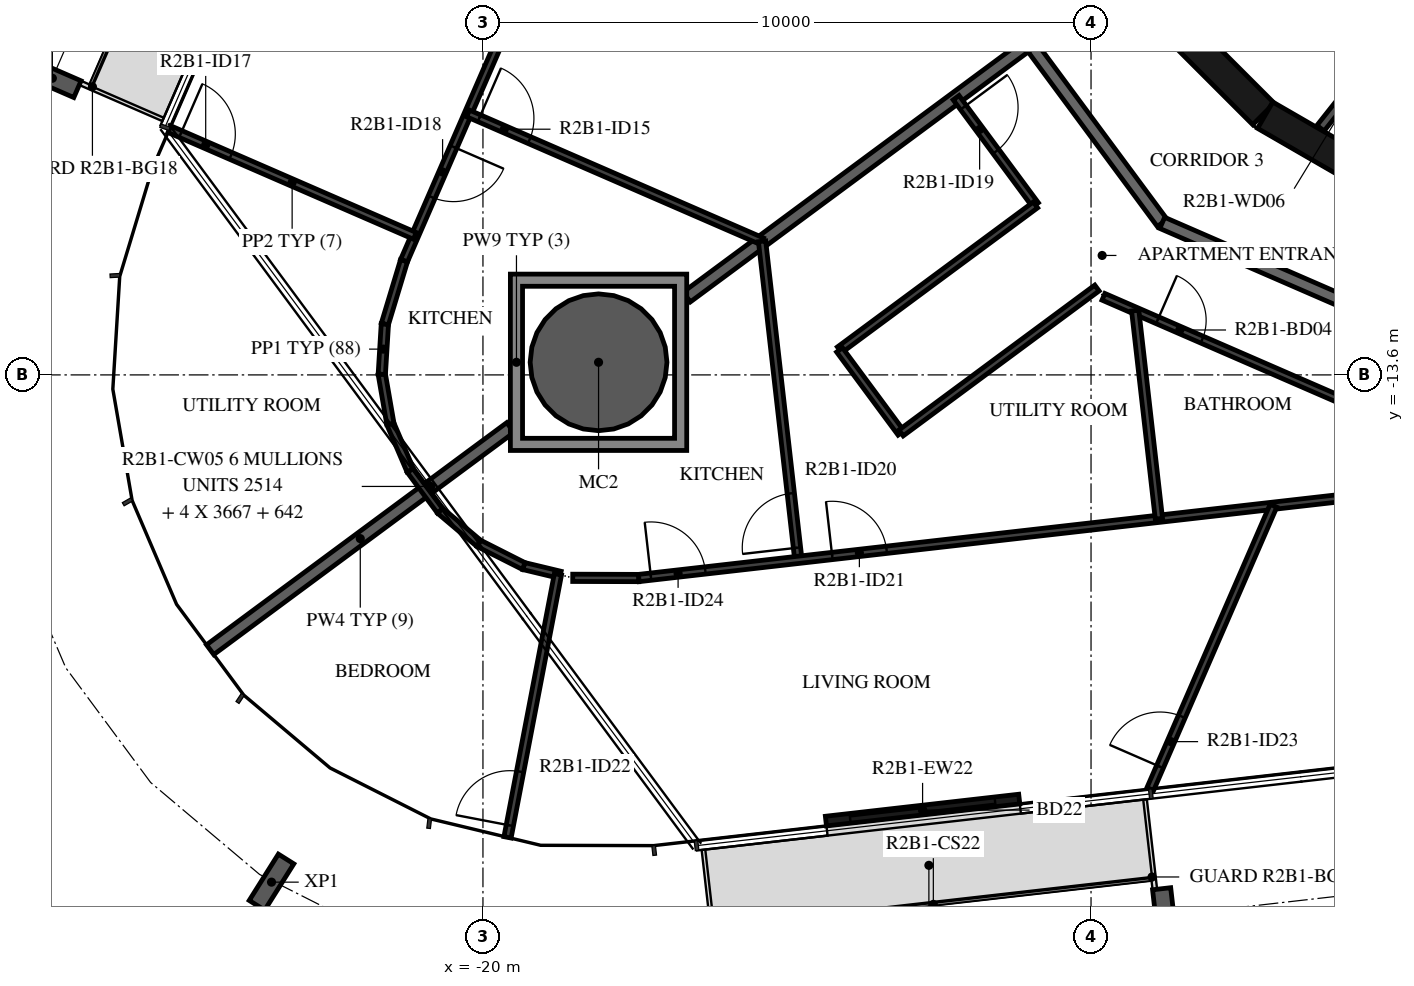
"""IFC4 building model, lengths in metres.
Left out: names, types, materials, properties, quantities, classifications, styles, units other than length and angle.
Written with IfcOpenShell. Run it as: python <this file> out.ifc"""

import sys

from ifc_helpers import new_model, si_unit, direction, frame, frame_2d, origin, origin_2d, place, context, subcontext, project, spatial, polyline, rectangle, hollow_circle, i_section, outline, extrude, element, fill, save


model = new_model("IFC4")
c1 = context("Model", 3, precision=1e-05, world=origin(), true_north=direction((0.0, 1.0)))
c2 = subcontext(c1, "Body", "Model", "MODEL_VIEW")
j1 = project(units=[si_unit("LENGTHUNIT", "METRE"), si_unit("PLANEANGLEUNIT", "RADIAN")], contexts=[c1])
p1 = place(None, origin())
s1 = spatial("IfcSite", under=j1, at=p1, CompositionType="ELEMENT")
p2 = place(p1, origin())
s2 = spatial("IfcBuilding", under=s1, at=p2, CompositionType="ELEMENT")
p3 = place(p2, frame((0.0, 0.0, 87.2)))
s3 = spatial("IfcBuildingStorey", under=s2, at=p3, CompositionType="ELEMENT", Elevation=87.2)
p4 = place(p3, frame((-18.099, -13.393, -0.38), z_axis=(0.0, 0.0, 1.0), x_axis=(1.0, 0.0, 0.0)))
e1 = element("IfcColumn", 1, at=p4, inside=s3, PredefinedType="COLUMN", context=c2, shape_type="SweptSolid", body=[
    extrude(hollow_circle(Radius=1.125, WallThickness=0.055, at=origin_2d()), origin(), (0.0, 0.0, 1.0), 3.5),
])
for number, where, z_axis, x_axis in (
    (2, (-27.081, -8.722, -0.38), (0.0, 0.0, 1.0), (0.399, 0.917, 0.0)),
    (3, (-23.477, -21.941, -0.38), (0.0, 0.0, 1.0), (-0.846, 0.532, 0.0)),
    (4, (-8.788, -22.497, -0.38), (0.0, 0.0, 1.0), (-0.994, -0.113, 0.0)),
):
    element("IfcColumn", number, at=place(p3, frame(where, z_axis=z_axis, x_axis=x_axis)), inside=s3, PredefinedType="COLUMN", context=c2, shape_type="SweptSolid", body=[
        extrude(i_section(OverallWidth=0.3, OverallDepth=0.9, WebThickness=0.019, FlangeThickness=0.035, FilletRadius=0.03, at=origin_2d()), origin(), (0.0, 0.0, 1.0), 3.5),
    ])
p5 = place(p3, frame((-14.36, -20.938, 0.0), z_axis=(0.0, 0.0, 1.0), x_axis=(0.993569019005, 0.11322810814, 0.0)))
e5 = element("IfcWall", 5, at=p5, inside=s3, PredefinedType="STANDARD", context=c2, shape_type="SweptSolid", body=[
    extrude(rectangle(XDim=3.2, YDim=0.16, at=frame_2d((1.6, 0.0))), origin(), (0.0, 0.0, 1.0), 3.12),
])
p6 = place(p5, frame((0.4, 0.0, 0.0)))
e6 = element("IfcOpeningElement", 6, at=p6, cuts=e5, PredefinedType="OPENING", context=c2, shape_type="SweptSolid", body=[
    extrude(rectangle(XDim=2.4, YDim=2.4, at=frame_2d((1.2, 1.2))), frame((0.0, 0.09, 0.0), z_axis=(0.0, -1.0, 0.0), x_axis=(1.0, 0.0, 0.0)), (0.0, 0.0, 1.0), 0.18),
])
p7 = place(p3, frame((-9.308, -7.164, 0.0), z_axis=(0.0, 0.0, 1.0), x_axis=(0.707106781187, -0.707106781187, 0.0)))
e7 = element("IfcWall", 7, at=p7, inside=s3, PredefinedType="SHEAR", context=c2, shape_type="SweptSolid", body=[
    extrude(rectangle(XDim=3.032, YDim=0.5, at=frame_2d((1.516, 0.0))), origin(), (0.0, 0.0, 1.0), 3.12),
])
p8 = place(p3, frame((-7.137, -9.329, 0.0), z_axis=(0.0, 0.0, 1.0), x_axis=(0.865975092491, -0.500087131594, 0.0)))
e8 = element("IfcWall", 8, at=p8, inside=s3, PredefinedType="SHEAR", context=c2, shape_type="SweptSolid", body=[
    extrude(rectangle(XDim=3.033, YDim=0.5, at=frame_2d((1.516, 0.0))), origin(), (0.0, 0.0, 1.0), 3.12),
])
p9 = place(p3, frame((-4.706, -7.625, 0.0), z_axis=(0.0, 0.0, 1.0), x_axis=(-0.621392599334, -0.783499353856, 0.0)))
e9 = element("IfcWall", 9, at=p9, inside=s3, PredefinedType="PARTITIONING", context=c2, shape_type="SweptSolid", body=[
    extrude(rectangle(XDim=2.447, YDim=0.15, at=frame_2d((1.224, 0.0))), origin(), (0.0, 0.0, 1.0), 3.12),
])
p10 = place(p9, frame((0.774, 0.0, 0.0)))
e10 = element("IfcOpeningElement", 10, at=p10, cuts=e9, PredefinedType="OPENING", context=c2, shape_type="SweptSolid", body=[
    extrude(rectangle(XDim=0.9, YDim=2.1, at=frame_2d((0.45, 1.05))), frame((0.0, 0.085, 0.0), z_axis=(0.0, -1.0, 0.0), x_axis=(1.0, 0.0, 0.0)), (0.0, 0.0, 1.0), 0.17),
])
p11 = place(p3, frame((-13.196, -5.198, 0.0), z_axis=(0.0, 0.0, 1.0), x_axis=(0.594805187394, -0.803869883159, 0.0)))
e11 = element("IfcWall", 11, at=p11, inside=s3, PredefinedType="STANDARD", context=c2, shape_type="SweptSolid", body=[
    extrude(rectangle(XDim=7.342, YDim=0.2, at=frame_2d((3.671, 0.0))), origin(), (0.0, 0.0, 1.0), 3.12),
])
p12 = place(p3, frame((-8.829, -11.1, 0.0), z_axis=(0.0, 0.0, 1.0), x_axis=(0.917063622491, -0.398740908742, 0.0)))
e12 = element("IfcWall", 12, at=p12, inside=s3, PredefinedType="STANDARD", context=c2, shape_type="SweptSolid", body=[
    extrude(rectangle(XDim=7.24, YDim=0.2, at=frame_2d((3.62, 0.0))), origin(), (0.0, 0.0, 1.0), 3.12),
])
p13 = place(p12, frame((6.04, 0.0, 0.0)))
e13 = element("IfcOpeningElement", 13, at=p13, cuts=e12, PredefinedType="OPENING", context=c2, shape_type="SweptSolid", body=[
    extrude(rectangle(XDim=1.0, YDim=2.1, at=frame_2d((0.5, 1.05))), frame((0.0, 0.11, 0.0), z_axis=(0.0, -1.0, 0.0), x_axis=(1.0, 0.0, 0.0)), (0.0, 0.0, 1.0), 0.22),
])
p14 = place(p3, frame((-16.649, -12.32, 0.0), z_axis=(0.0, 0.0, 1.0), x_axis=(0.803869204071, 0.594806105169, 0.0)))
e14 = element("IfcWall", 14, at=p14, inside=s3, PredefinedType="STANDARD", context=c2, shape_type="SweptSolid", body=[
    extrude(rectangle(XDim=7.011, YDim=0.2, at=frame_2d((3.506, 0.0))), origin(), (0.0, 0.0, 1.0), 3.12),
])
p15 = place(p3, frame((-24.486, -18.119, 0.0), z_axis=(0.0, 0.0, 1.0), x_axis=(0.80384227933, 0.594842491726, 0.0)))
e15 = element("IfcWall", 15, at=p15, inside=s3, PredefinedType="STANDARD", context=c2, shape_type="SweptSolid", body=[
    extrude(rectangle(XDim=6.142, YDim=0.2, at=frame_2d((3.071, 0.0))), origin(), (0.0, 0.0, 1.0), 3.12),
])
p16 = place(p3, frame((-17.109, -2.089, 0.0), z_axis=(0.0, 0.0, 1.0), x_axis=(-0.398743957683, -0.9170622968, 0.0)))
e16 = element("IfcWall", 16, at=p16, inside=s3, PredefinedType="PARTITIONING", context=c2, shape_type="SweptSolid", body=[
    extrude(rectangle(XDim=10.505, YDim=0.12, at=frame_2d((5.252, 0.0))), origin(), (0.0, 0.0, 1.0), 3.12),
])
p17 = place(p16, frame((2.056, 0.0, 0.0)))
e17 = element("IfcOpeningElement", 17, at=p17, cuts=e16, PredefinedType="OPENING", context=c2, shape_type="SweptSolid", body=[
    extrude(rectangle(XDim=0.9, YDim=2.1, at=frame_2d((0.45, 1.05))), frame((0.0, 0.07, 0.0), z_axis=(0.0, -1.0, 0.0), x_axis=(1.0, 0.0, 0.0)), (0.0, 0.0, 1.0), 0.14),
])
p18 = place(p16, frame((8.464, 0.0, 0.0)))
e18 = element("IfcOpeningElement", 18, at=p18, cuts=e16, PredefinedType="OPENING", context=c2, shape_type="SweptSolid", body=[
    extrude(rectangle(XDim=0.9, YDim=2.1, at=frame_2d((0.45, 1.05))), frame((0.0, 0.07, 0.0), z_axis=(0.0, -1.0, 0.0), x_axis=(1.0, 0.0, 0.0)), (0.0, 0.0, 1.0), 0.14),
])
p19 = place(p3, frame((-20.245, -9.3, 0.0), z_axis=(0.0, 0.0, 1.0), x_axis=(0.91706784774, -0.398731190956, 0.0)))
e19 = element("IfcWall", 19, at=p19, inside=s3, PredefinedType="PARTITIONING", context=c2, shape_type="SweptSolid", body=[
    extrude(rectangle(XDim=5.272, YDim=0.12, at=frame_2d((2.636, 0.0))), origin(), (0.0, 0.0, 1.0), 3.12),
])
p20 = place(p19, frame((0.2, 0.0, 0.0)))
e20 = element("IfcOpeningElement", 20, at=p20, cuts=e19, PredefinedType="OPENING", context=c2, shape_type="SweptSolid", body=[
    extrude(rectangle(XDim=0.9, YDim=2.1, at=frame_2d((0.45, 1.05))), frame((0.0, 0.07, 0.0), z_axis=(0.0, -1.0, 0.0), x_axis=(1.0, 0.0, 0.0)), (0.0, 0.0, 1.0), 0.14),
])
p21 = place(p3, frame((-25.156, -9.559, 0.0), z_axis=(0.0, 0.0, 1.0), x_axis=(0.917042707292, -0.398789008127, 0.0)))
e21 = element("IfcWall", 21, at=p21, inside=s3, PredefinedType="PARTITIONING", context=c2, shape_type="SweptSolid", body=[
    extrude(rectangle(XDim=4.4, YDim=0.12, at=frame_2d((2.2, 0.0))), origin(), (0.0, 0.0, 1.0), 2.73),
])
p22 = place(p21, frame((0.2, 0.0, 0.0)))
e22 = element("IfcOpeningElement", 22, at=p22, cuts=e21, PredefinedType="OPENING", context=c2, shape_type="SweptSolid", body=[
    extrude(rectangle(XDim=0.9, YDim=2.1, at=frame_2d((0.45, 1.05))), frame((0.0, 0.07, 0.0), z_axis=(0.0, -1.0, 0.0), x_axis=(1.0, 0.0, 0.0)), (0.0, 0.0, 1.0), 0.14),
])
for number, where, z_axis, x_axis in (
    (23, (-20.703, -15.835, 0.0), (0.0, 0.0, 1.0), (-0.595, 0.804, 0.0)),
    (24, (-21.196, -15.168, 0.0), (0.0, 0.0, 1.0), (-0.394, 0.919, 0.0)),
):
    element("IfcWall", number, at=place(p3, frame(where, z_axis=z_axis, x_axis=x_axis)), inside=s3, PredefinedType="PARTITIONING", context=c2, shape_type="SweptSolid", body=[
        extrude(rectangle(XDim=0.829, YDim=0.12, at=frame_2d((0.415, 0.0))), origin(), (0.0, 0.0, 1.0), 3.12),
    ])
p23 = place(p3, frame((-21.522, -14.406, 0.0), z_axis=(0.0, 0.0, 1.0), x_axis=(-0.170794347099, 0.985306698952, 0.0)))
e25 = element("IfcWall", 25, at=p23, inside=s3, PredefinedType="PARTITIONING", context=c2, shape_type="SweptSolid", body=[
    extrude(rectangle(XDim=0.829, YDim=0.12, at=frame_2d((0.415, 0.0))), origin(), (0.0, 0.0, 1.0), 3.12),
])
p24 = place(p3, frame((-21.664, -13.59, 0.0), z_axis=(0.0, 0.0, 1.0), x_axis=(0.061277779288, 0.998120751095, 0.0)))
e26 = element("IfcWall", 26, at=p24, inside=s3, PredefinedType="PARTITIONING", context=c2, shape_type="SweptSolid", body=[
    extrude(rectangle(XDim=0.829, YDim=0.12, at=frame_2d((0.414, 0.0))), origin(), (0.0, 0.0, 1.0), 3.12),
])
p25 = place(p3, frame((-21.613, -12.762, 0.0), z_axis=(0.0, 0.0, 1.0), x_axis=(0.289552239308, 0.95716221233, 0.0)))
e27 = element("IfcWall", 27, at=p25, inside=s3, PredefinedType="PARTITIONING", context=c2, shape_type="SweptSolid", body=[
    extrude(rectangle(XDim=1.087, YDim=0.12, at=frame_2d((0.543, 0.0))), origin(), (0.0, 0.0, 1.0), 3.12),
])
p26 = place(p3, frame((-12.219, -9.041, 0.0), z_axis=(0.0, 0.0, 1.0), x_axis=(0.59482286703, -0.803856801214, 0.0)))
e28 = element("IfcWall", 28, at=p26, inside=s3, PredefinedType="PARTITIONING", context=c2, shape_type="SweptSolid", body=[
    extrude(rectangle(XDim=2.193, YDim=0.12, at=frame_2d((1.097, 0.0))), origin(), (0.0, 0.0, 1.0), 3.12),
])
p27 = place(p26, frame((0.2, 0.0, 0.0)))
e29 = element("IfcOpeningElement", 29, at=p27, cuts=e28, PredefinedType="OPENING", context=c2, shape_type="SweptSolid", body=[
    extrude(rectangle(XDim=0.9, YDim=2.1, at=frame_2d((0.45, 1.05))), frame((0.0, 0.07, 0.0), z_axis=(0.0, -1.0, 0.0), x_axis=(1.0, 0.0, 0.0)), (0.0, 0.0, 1.0), 0.14),
])
p28 = place(p3, frame((-10.914, -10.804, 0.0), z_axis=(0.0, 0.0, 1.0), x_axis=(-0.803864616889, -0.594812304609, 0.0)))
e30 = element("IfcWall", 30, at=p28, inside=s3, PredefinedType="PARTITIONING", context=c2, shape_type="SweptSolid", body=[
    extrude(rectangle(XDim=4.008, YDim=0.12, at=frame_2d((2.004, 0.0))), origin(), (0.0, 0.0, 1.0), 3.12),
])
p29 = place(p3, frame((-14.136, -13.188, 0.0), z_axis=(0.0, 0.0, 1.0), x_axis=(0.594863421241, -0.803826791087, 0.0)))
e31 = element("IfcWall", 31, at=p29, inside=s3, PredefinedType="PARTITIONING", context=c2, shape_type="SweptSolid", body=[
    extrude(rectangle(XDim=1.7, YDim=0.12, at=frame_2d((0.85, 0.0))), origin(), (0.0, 0.0, 1.0), 3.12),
])
p30 = place(p3, frame((-13.125, -14.555, 0.0), z_axis=(0.0, 0.0, 1.0), x_axis=(0.80389374229, 0.594772940799, 0.0)))
e32 = element("IfcWall", 32, at=p30, inside=s3, PredefinedType="PARTITIONING", context=c2, shape_type="SweptSolid", body=[
    extrude(rectangle(XDim=4.008, YDim=0.12, at=frame_2d((2.004, 0.0))), origin(), (0.0, 0.0, 1.0), 3.12),
])
p31 = place(p3, frame((-9.796, -12.315, 0.0), z_axis=(0.0, 0.0, 1.0), x_axis=(0.917059572812, -0.398750222463, 0.0)))
e33 = element("IfcWall", 33, at=p31, inside=s3, PredefinedType="PARTITIONING", context=c2, shape_type="SweptSolid", body=[
    extrude(rectangle(XDim=8.146, YDim=0.12, at=frame_2d((4.073, 0.0))), origin(), (0.0, 0.0, 1.0), 3.12),
])
p32 = place(p31, frame((0.969, 0.0, 0.0)))
e34 = element("IfcOpeningElement", 34, at=p32, cuts=e33, PredefinedType="OPENING", context=c2, shape_type="SweptSolid", body=[
    extrude(rectangle(XDim=0.8, YDim=2.1, at=frame_2d((0.4, 1.05))), frame((0.0, 0.07, 0.0), z_axis=(0.0, -1.0, 0.0), x_axis=(1.0, 0.0, 0.0)), (0.0, 0.0, 1.0), 0.14),
])
p33 = place(p3, frame((-18.728, -16.888, 0.0), z_axis=(0.0, 0.0, 1.0), x_axis=(-0.972351484507, 0.233522141512, 0.0)))
e35 = element("IfcWall", 35, at=p33, inside=s3, PredefinedType="PARTITIONING", context=c2, shape_type="SweptSolid", body=[
    extrude(rectangle(XDim=0.619, YDim=0.12, at=frame_2d((0.31, 0.0))), origin(), (0.0, 0.0, 1.0), 3.12),
])
for number, where, z_axis, x_axis in (
    (36, (-19.33, -16.744, 0.0), (0.0, 0.0, 1.0), (-0.892, 0.451, 0.0)),
    (37, (-20.069, -16.369, 0.0), (0.0, 0.0, 1.0), (-0.764, 0.645, 0.0)),
):
    element("IfcWall", number, at=place(p3, frame(where, z_axis=z_axis, x_axis=x_axis)), inside=s3, PredefinedType="PARTITIONING", context=c2, shape_type="SweptSolid", body=[
        extrude(rectangle(XDim=0.829, YDim=0.12, at=frame_2d((0.415, 0.0))), origin(), (0.0, 0.0, 1.0), 3.12),
    ])
p34 = place(p3, frame((-19.596, -21.205, 0.0), z_axis=(0.0, 0.0, 1.0), x_axis=(0.188168961647, 0.982136671687, 0.0)))
e38 = element("IfcWall", 38, at=p34, inside=s3, PredefinedType="PARTITIONING", context=c2, shape_type="SweptSolid", body=[
    extrude(rectangle(XDim=4.405, YDim=0.12, at=frame_2d((2.202, 0.0))), origin(), (0.0, 0.0, 1.0), 3.12),
])
p35 = place(p34, frame((0.2, 0.0, 0.0)))
e39 = element("IfcOpeningElement", 39, at=p35, cuts=e38, PredefinedType="OPENING", context=c2, shape_type="SweptSolid", body=[
    extrude(rectangle(XDim=0.9, YDim=2.1, at=frame_2d((0.45, 1.05))), frame((0.0, 0.07, 0.0), z_axis=(0.0, -1.0, 0.0), x_axis=(1.0, 0.0, 0.0)), (0.0, 0.0, 1.0), 0.14),
])
p36 = place(p3, frame((-14.813, -16.641, 0.0), z_axis=(0.0, 0.0, 1.0), x_axis=(-0.113210971478, 0.993570971767, 0.0)))
e40 = element("IfcWall", 40, at=p36, inside=s3, PredefinedType="PARTITIONING", context=c2, shape_type="SweptSolid", body=[
    extrude(rectangle(XDim=5.273, YDim=0.12, at=frame_2d((2.636, 0.0))), origin(), (0.0, 0.0, 1.0), 3.12),
])
p37 = place(p36, frame((0.2, 0.0, 0.0)))
e41 = element("IfcOpeningElement", 41, at=p37, cuts=e40, PredefinedType="OPENING", context=c2, shape_type="SweptSolid", body=[
    extrude(rectangle(XDim=0.9, YDim=2.1, at=frame_2d((0.45, 1.05))), frame((0.0, 0.07, 0.0), z_axis=(0.0, -1.0, 0.0), x_axis=(1.0, 0.0, 0.0)), (0.0, 0.0, 1.0), 0.14),
])
p38 = place(p3, frame((-18.524, -16.937, 0.0), z_axis=(0.0, 0.0, 1.0), x_axis=(0.999995736722, -0.00292002349, 0.0)))
e42 = element("IfcWall", 42, at=p38, inside=s3, PredefinedType="PARTITIONING", context=c2, shape_type="SweptSolid", body=[
    extrude(rectangle(XDim=1.087, YDim=0.12, at=frame_2d((0.543, 0.0))), origin(), (0.0, 0.0, 1.0), 3.12),
])
p39 = place(p3, frame((-17.437, -16.94, 0.0), z_axis=(0.0, 0.0, 1.0), x_axis=(0.993573314119, 0.113190412448, 0.0)))
e43 = element("IfcWall", 43, at=p39, inside=s3, PredefinedType="PARTITIONING", context=c2, shape_type="SweptSolid", body=[
    extrude(rectangle(XDim=14.576, YDim=0.12, at=frame_2d((7.288, 0.0))), origin(), (0.0, 0.0, 1.0), 3.12),
])
p40 = place(p39, frame((3.201, 0.0, 0.0)))
e44 = element("IfcOpeningElement", 44, at=p40, cuts=e43, PredefinedType="OPENING", context=c2, shape_type="SweptSolid", body=[
    extrude(rectangle(XDim=0.9, YDim=2.1, at=frame_2d((0.45, 1.05))), frame((0.0, 0.07, 0.0), z_axis=(0.0, -1.0, 0.0), x_axis=(1.0, 0.0, 0.0)), (0.0, 0.0, 1.0), 0.14),
])
p41 = place(p39, frame((0.2, 0.0, 0.0)))
e45 = element("IfcOpeningElement", 45, at=p41, cuts=e43, PredefinedType="OPENING", context=c2, shape_type="SweptSolid", body=[
    extrude(rectangle(XDim=0.9, YDim=2.1, at=frame_2d((0.45, 1.05))), frame((0.0, 0.07, 0.0), z_axis=(0.0, -1.0, 0.0), x_axis=(1.0, 0.0, 0.0)), (0.0, 0.0, 1.0), 0.14),
])
p42 = place(p3, frame((-8.884, -15.966, 0.0), z_axis=(0.0, 0.0, 1.0), x_axis=(-0.113230836929, 0.993568708026, 0.0)))
e46 = element("IfcWall", 46, at=p42, inside=s3, PredefinedType="PARTITIONING", context=c2, shape_type="SweptSolid", body=[
    extrude(rectangle(XDim=3.446, YDim=0.12, at=frame_2d((1.723, 0.0))), origin(), (0.0, 0.0, 1.0), 3.12),
])
p43 = place(p3, frame((-9.026, -20.41, 0.0), z_axis=(0.0, 0.0, 1.0), x_axis=(0.398750711167, 0.917059360316, 0.0)))
e47 = element("IfcWall", 47, at=p43, inside=s3, PredefinedType="PARTITIONING", context=c2, shape_type="SweptSolid", body=[
    extrude(rectangle(XDim=5.081, YDim=0.12, at=frame_2d((2.54, 0.0))), origin(), (0.0, 0.0, 1.0), 3.12),
])
p44 = place(p43, frame((0.4, 0.0, 0.0)))
e48 = element("IfcOpeningElement", 48, at=p44, cuts=e47, PredefinedType="OPENING", context=c2, shape_type="SweptSolid", body=[
    extrude(rectangle(XDim=0.9, YDim=2.1, at=frame_2d((0.45, 1.05))), frame((0.0, 0.07, 0.0), z_axis=(0.0, -1.0, 0.0), x_axis=(1.0, 0.0, 0.0)), (0.0, 0.0, 1.0), 0.14),
])
p45 = place(p3, origin())
e49 = element("IfcWall", 49, at=p45, inside=s3, PredefinedType="STANDARD", context=c2, shape_type="SweptSolid", body=[
    extrude(outline(polyline([(-16.649, -11.942), (-16.649, -14.843), (-19.549, -14.843), (-19.549, -11.942), (-16.649, -11.942)]), holes=[polyline([(-19.349, -14.643), (-16.849, -14.643), (-16.849, -12.143), (-19.349, -12.143), (-19.349, -14.643)])]), origin(), (0.0, 0.0, 1.0), 3.12),
])
p46 = place(p6, origin())
e50 = element("IfcDoor", 50, at=p46, inside=s3, OperationType="DOUBLE_DOOR_SLIDING", PredefinedType="DOOR", context=c2, shape_type="SweptSolid", body=[
    extrude(rectangle(XDim=2.4, YDim=2.4, at=frame_2d((1.2, 1.2))), frame((0.0, 0.025, 0.0), z_axis=(0.0, -1.0, 0.0), x_axis=(1.0, 0.0, 0.0)), (0.0, 0.0, 1.0), 0.05),
])
fill(e6, e50)
p47 = place(p20, origin())
e51 = element("IfcDoor", 51, at=p47, inside=s3, OperationType="SINGLE_SWING_RIGHT", PredefinedType="DOOR", context=c2, shape_type="SweptSolid", body=[
    extrude(rectangle(XDim=0.9, YDim=2.1, at=frame_2d((0.45, 1.05))), frame((0.0, 0.025, 0.0), z_axis=(0.0, -1.0, 0.0), x_axis=(1.0, 0.0, 0.0)), (0.0, 0.0, 1.0), 0.05),
])
fill(e20, e51)
p48 = place(p22, origin())
e52 = element("IfcDoor", 52, at=p48, inside=s3, OperationType="SINGLE_SWING_RIGHT", PredefinedType="DOOR", context=c2, shape_type="SweptSolid", body=[
    extrude(rectangle(XDim=0.9, YDim=2.1, at=frame_2d((0.45, 1.05))), frame((0.0, 0.025, 0.0), z_axis=(0.0, -1.0, 0.0), x_axis=(1.0, 0.0, 0.0)), (0.0, 0.0, 1.0), 0.05),
])
fill(e22, e52)
p49 = place(p18, origin())
e53 = element("IfcDoor", 53, at=p49, inside=s3, OperationType="SINGLE_SWING_LEFT", PredefinedType="DOOR", context=c2, shape_type="SweptSolid", body=[
    extrude(rectangle(XDim=0.9, YDim=2.1, at=frame_2d((0.45, 1.05))), frame((0.0, 0.025, 0.0), z_axis=(0.0, -1.0, 0.0), x_axis=(1.0, 0.0, 0.0)), (0.0, 0.0, 1.0), 0.05),
])
fill(e18, e53)
p50 = place(p27, origin())
e54 = element("IfcDoor", 54, at=p50, inside=s3, OperationType="SINGLE_SWING_LEFT", PredefinedType="DOOR", context=c2, shape_type="SweptSolid", body=[
    extrude(rectangle(XDim=0.9, YDim=2.1, at=frame_2d((0.45, 1.05))), frame((0.0, 0.025, 0.0), z_axis=(0.0, -1.0, 0.0), x_axis=(1.0, 0.0, 0.0)), (0.0, 0.0, 1.0), 0.05),
])
fill(e29, e54)
p51 = place(p32, origin())
e55 = element("IfcDoor", 55, at=p51, inside=s3, OperationType="SINGLE_SWING_LEFT", PredefinedType="DOOR", context=c2, shape_type="SweptSolid", body=[
    extrude(rectangle(XDim=0.8, YDim=2.1, at=frame_2d((0.4, 1.05))), frame((0.0, 0.025, 0.0), z_axis=(0.0, -1.0, 0.0), x_axis=(1.0, 0.0, 0.0)), (0.0, 0.0, 1.0), 0.05),
])
fill(e34, e55)
p52 = place(p37, origin())
e56 = element("IfcDoor", 56, at=p52, inside=s3, OperationType="SINGLE_SWING_LEFT", PredefinedType="DOOR", context=c2, shape_type="SweptSolid", body=[
    extrude(rectangle(XDim=0.9, YDim=2.1, at=frame_2d((0.45, 1.05))), frame((0.0, 0.025, 0.0), z_axis=(0.0, -1.0, 0.0), x_axis=(1.0, 0.0, 0.0)), (0.0, 0.0, 1.0), 0.05),
])
fill(e41, e56)
p53 = place(p40, origin())
e57 = element("IfcDoor", 57, at=p53, inside=s3, OperationType="SINGLE_SWING_LEFT", PredefinedType="DOOR", context=c2, shape_type="SweptSolid", body=[
    extrude(rectangle(XDim=0.9, YDim=2.1, at=frame_2d((0.45, 1.05))), frame((0.0, 0.025, 0.0), z_axis=(0.0, -1.0, 0.0), x_axis=(1.0, 0.0, 0.0)), (0.0, 0.0, 1.0), 0.05),
])
fill(e44, e57)
p54 = place(p35, origin())
e58 = element("IfcDoor", 58, at=p54, inside=s3, OperationType="SINGLE_SWING_LEFT", PredefinedType="DOOR", context=c2, shape_type="SweptSolid", body=[
    extrude(rectangle(XDim=0.9, YDim=2.1, at=frame_2d((0.45, 1.05))), frame((0.0, 0.025, 0.0), z_axis=(0.0, -1.0, 0.0), x_axis=(1.0, 0.0, 0.0)), (0.0, 0.0, 1.0), 0.05),
])
fill(e39, e58)
p55 = place(p44, origin())
e59 = element("IfcDoor", 59, at=p55, inside=s3, OperationType="SINGLE_SWING_RIGHT", PredefinedType="DOOR", context=c2, shape_type="SweptSolid", body=[
    extrude(rectangle(XDim=0.9, YDim=2.1, at=frame_2d((0.45, 1.05))), frame((0.0, 0.025, 0.0), z_axis=(0.0, -1.0, 0.0), x_axis=(1.0, 0.0, 0.0)), (0.0, 0.0, 1.0), 0.05),
])
fill(e48, e59)
p56 = place(p41, origin())
e60 = element("IfcDoor", 60, at=p56, inside=s3, OperationType="SINGLE_SWING_LEFT", PredefinedType="DOOR", context=c2, shape_type="SweptSolid", body=[
    extrude(rectangle(XDim=0.9, YDim=2.1, at=frame_2d((0.45, 1.05))), frame((0.0, 0.025, 0.0), z_axis=(0.0, -1.0, 0.0), x_axis=(1.0, 0.0, 0.0)), (0.0, 0.0, 1.0), 0.05),
])
fill(e45, e60)
save(model, sys.argv[1])
